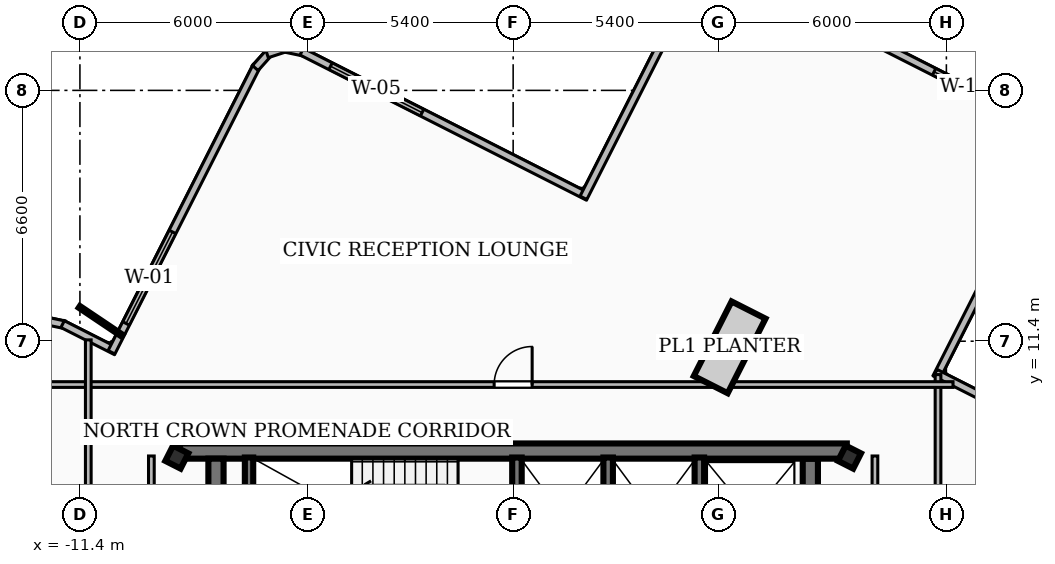
"""IFC4 building model, lengths in metres.
Left out: names, types, materials, properties, quantities, classifications, styles, units other than length and angle.
Written with IfcOpenShell. Run it as: python <this file> out.ifc"""

import sys

from ifc_helpers import new_model, si_unit, direction, frame, frame_2d, origin, origin_2d, place, context, subcontext, project, spatial, rectangle, hollow_rectangle, extrude, element, fill, save


model = new_model("IFC4")
c1 = context("Model", 3, precision=1e-05, world=origin(), true_north=direction((0.0, 1.0)))
c2 = subcontext(c1, "Body", "Model", "MODEL_VIEW")
j1 = project(units=[si_unit("LENGTHUNIT", "METRE"), si_unit("PLANEANGLEUNIT", "RADIAN")], contexts=[c1])
p1 = place(None, origin())
s1 = spatial("IfcSite", under=j1, at=p1, CompositionType="ELEMENT")
p2 = place(p1, origin())
s2 = spatial("IfcBuilding", under=s1, at=p2, CompositionType="ELEMENT")
p3 = place(p2, frame((0.0, 0.0, 289.26)))
s3 = spatial("IfcBuildingStorey", under=s2, at=p3, CompositionType="ELEMENT", Elevation=289.26)
p4 = place(p3, frame((-8.78, 8.51, 0.0), z_axis=(0.0, 0.0, 1.0), x_axis=(1.0, 0.0, 0.0)))
e1 = element("IfcWall", 1, at=p4, inside=s3, PredefinedType="SHEAR", context=c2, shape_type="SweptSolid", body=[
    extrude(rectangle(XDim=17.56, YDim=0.4, at=frame_2d((8.78, 0.0))), origin(), (0.0, 0.0, 1.0), 3.84),
])
for number, where, z_axis, x_axis in (
    (2, (-7.82, 1.95, 0.0), (0.0, 0.0, 1.0), (0.0, 1.0, 0.0)),
    (3, (7.82, 8.31, 0.0), (0.0, 0.0, 1.0), (0.0, -1.0, 0.0)),
):
    element("IfcWall", number, at=place(p3, frame(where, z_axis=z_axis, x_axis=x_axis)), inside=s3, PredefinedType="SHEAR", context=c2, shape_type="SweptSolid", body=[
        extrude(rectangle(XDim=6.36, YDim=0.4, at=frame_2d((3.18, 0.0))), origin(), (0.0, 0.0, 1.0), 3.84),
    ])
p5 = place(p3, frame((-6.95, 5.28, 0.0), z_axis=(0.0, 0.0, 1.0), x_axis=(0.0, 1.0, 0.0)))
e4 = element("IfcWall", 4, at=p5, inside=s3, PredefinedType="SOLIDWALL", context=c2, shape_type="SweptSolid", body=[
    extrude(rectangle(XDim=3.06, YDim=0.22, at=frame_2d((1.53, 0.0))), origin(), (0.0, 0.0, 1.0), 3.84),
])
for number, where, z_axis, x_axis in (
    (5, (0.1, 5.3, 0.0), (0.0, 0.0, 1.0), (0.0, 1.0, 0.0)),
    (6, (2.5, 5.3, 0.0), (0.0, 0.0, 1.0), (0.0, 1.0, 0.0)),
    (7, (4.9, 5.3, 0.0), (0.0, 0.0, 1.0), (0.0, 1.0, 0.0)),
):
    element("IfcWall", number, at=place(p3, frame(where, z_axis=z_axis, x_axis=x_axis)), inside=s3, PredefinedType="SOLIDWALL", context=c2, shape_type="SweptSolid", body=[
        extrude(rectangle(XDim=3.04, YDim=0.25, at=frame_2d((1.52, 0.0))), origin(), (0.0, 0.0, 1.0), 3.84),
    ])
for number, where, z_axis, x_axis in (
    (8, (-8.85, 8.35, 0.0), (0.0, 0.0, 1.0), (0.452, 0.892, 0.0)),
    (9, (8.85, 8.35, 0.0), (0.0, 0.0, 1.0), (0.452, 0.892, 0.0)),
):
    element("IfcColumn", number, at=place(p3, frame(where, z_axis=z_axis, x_axis=x_axis)), inside=s3, PredefinedType="COLUMN", context=c2, shape_type="SweptSolid", body=[
        extrude(hollow_rectangle(XDim=0.45, YDim=0.45, WallThickness=0.022, at=origin_2d()), origin(), (0.0, 0.0, 1.0), 4.14),
    ])
p6 = place(p3, frame((-12.324, 11.942, 0.0), z_axis=(0.0, 0.0, 1.0), x_axis=(0.978736488985, -0.20512163496, 0.0)))
e10 = element("IfcWall", 10, at=p6, inside=s3, PredefinedType="SOLIDWALL", context=c2, shape_type="SweptSolid", body=[
    extrude(rectangle(XDim=0.526, YDim=0.2, at=frame_2d((0.263, 0.0))), origin(), (0.0, 0.0, 1.0), 3.84),
])
p7 = place(p3, frame((-11.855, 11.85, 0.0), z_axis=(0.0, 0.0, 1.0), x_axis=(0.891975264725, -0.452084203572, 0.0)))
e11 = element("IfcWall", 11, at=p7, inside=s3, PredefinedType="SOLIDWALL", context=c2, shape_type="SweptSolid", body=[
    extrude(rectangle(XDim=1.562, YDim=0.2, at=frame_2d((0.781, 0.0))), origin(), (0.0, 0.0, 1.0), 3.84),
])
p8 = place(p3, frame((-10.569, 11.109, 0.0), z_axis=(0.0, 0.0, 1.0), x_axis=(0.452141134176, 0.891946408024, 0.0)))
e12 = element("IfcWall", 12, at=p8, inside=s3, PredefinedType="SOLIDWALL", context=c2, shape_type="SweptSolid", body=[
    extrude(rectangle(XDim=8.431, YDim=0.2, at=frame_2d((4.215, 0.0))), origin(), (0.0, 0.0, 1.0), 3.84),
])
p9 = place(p8, frame((0.85, 0.0, 0.85)))
e13 = element("IfcOpeningElement", 13, at=p9, cuts=e12, PredefinedType="OPENING", context=c2, shape_type="SweptSolid", body=[
    extrude(rectangle(XDim=2.7, YDim=2.1, at=frame_2d((1.35, 1.05))), frame((0.0, 0.11, 0.0), z_axis=(0.0, -1.0, 0.0), x_axis=(1.0, 0.0, 0.0)), (0.0, 0.0, 1.0), 0.22),
])
p10 = place(p3, frame((-6.785, 18.588, 0.0), z_axis=(0.0, 0.0, 1.0), x_axis=(0.665997400104, 0.745954062295, 0.0)))
e14 = element("IfcWall", 14, at=p10, inside=s3, PredefinedType="SOLIDWALL", context=c2, shape_type="SweptSolid", body=[
    extrude(rectangle(XDim=0.528, YDim=0.2, at=frame_2d((0.264, 0.0))), origin(), (0.0, 0.0, 1.0), 3.84),
])
p11 = place(p3, frame((-6.474, 18.955, 0.0), z_axis=(0.0, 0.0, 1.0), x_axis=(0.950471064968, 0.310813054196, 0.0)))
e15 = element("IfcWall", 15, at=p11, inside=s3, PredefinedType="SOLIDWALL", context=c2, shape_type="SweptSolid", body=[
    extrude(rectangle(XDim=0.514, YDim=0.2, at=frame_2d((0.257, 0.0))), origin(), (0.0, 0.0, 1.0), 3.84),
])
p12 = place(p3, frame((-6.033, 19.112, 0.0), z_axis=(0.0, 0.0, 1.0), x_axis=(0.978721450967, -0.205193375664, 0.0)))
e16 = element("IfcWall", 16, at=p12, inside=s3, PredefinedType="SOLIDWALL", context=c2, shape_type="SweptSolid", body=[
    extrude(rectangle(XDim=0.527, YDim=0.2, at=frame_2d((0.264, 0.0))), origin(), (0.0, 0.0, 1.0), 3.84),
])
p13 = place(p3, frame((-5.563, 19.02, 0.0), z_axis=(0.0, 0.0, 1.0), x_axis=(0.891946408024, -0.452141134176, 0.0)))
e17 = element("IfcWall", 17, at=p13, inside=s3, PredefinedType="SOLIDWALL", context=c2, shape_type="SweptSolid", body=[
    extrude(rectangle(XDim=8.431, YDim=0.2, at=frame_2d((4.215, 0.0))), origin(), (0.0, 0.0, 1.0), 3.84),
])
p14 = place(p13, frame((0.85, 0.0, 0.85)))
e18 = element("IfcOpeningElement", 18, at=p14, cuts=e17, PredefinedType="OPENING", context=c2, shape_type="SweptSolid", body=[
    extrude(rectangle(XDim=2.7, YDim=1.85, at=frame_2d((1.35, 0.925))), frame((0.0, 0.11, 0.0), z_axis=(0.0, -1.0, 0.0), x_axis=(1.0, 0.0, 0.0)), (0.0, 0.0, 1.0), 0.22),
])
p15 = place(p3, frame((1.85, 15.173, 0.0), z_axis=(0.0, 0.0, 1.0), x_axis=(0.452151126281, 0.891941342804, 0.0)))
e19 = element("IfcWall", 19, at=p15, inside=s3, PredefinedType="SOLIDWALL", context=c2, shape_type="SweptSolid", body=[
    extrude(rectangle(XDim=6.241, YDim=0.2, at=frame_2d((3.121, 0.0))), origin(), (0.0, 0.0, 1.0), 3.84),
])
p16 = place(p3, frame((5.866, 21.131, 0.0), z_axis=(0.0, 0.0, 1.0), x_axis=(0.89192763746, -0.452178161276, 0.0)))
e20 = element("IfcWall", 20, at=p16, inside=s3, PredefinedType="SOLIDWALL", context=c2, shape_type="SweptSolid", body=[
    extrude(rectangle(XDim=8.643, YDim=0.2, at=frame_2d((4.322, 0.0))), origin(), (0.0, 0.0, 1.0), 3.84),
])
p17 = place(p16, frame((5.842, 0.0, 0.85)))
e21 = element("IfcOpeningElement", 21, at=p17, cuts=e20, PredefinedType="OPENING", context=c2, shape_type="SweptSolid", body=[
    extrude(rectangle(XDim=1.8, YDim=1.6, at=frame_2d((0.9, 0.8))), frame((0.0, 0.11, 0.0), z_axis=(0.0, -1.0, 0.0), x_axis=(1.0, 0.0, 0.0)), (0.0, 0.0, 1.0), 0.22),
])
p18 = place(p3, frame((13.966, 16.029, 0.0), z_axis=(0.0, 0.0, 1.0), x_axis=(-0.452135351256, -0.891949339449, 0.0)))
e22 = element("IfcWall", 22, at=p18, inside=s3, PredefinedType="SOLIDWALL", context=c2, shape_type="SweptSolid", body=[
    extrude(rectangle(XDim=6.241, YDim=0.2, at=frame_2d((3.121, 0.0))), origin(), (0.0, 0.0, 1.0), 3.84),
])
p19 = place(p3, frame((11.109, 10.569, 0.0), z_axis=(0.0, 0.0, 1.0), x_axis=(0.891946408024, -0.452141134176, 0.0)))
e23 = element("IfcWall", 23, at=p19, inside=s3, PredefinedType="SOLIDWALL", context=c2, shape_type="SweptSolid", body=[
    extrude(rectangle(XDim=8.431, YDim=0.2, at=frame_2d((4.215, 0.0))), origin(), (0.0, 0.0, 1.0), 3.84),
])
p20 = place(p19, frame((1.35, 0.0, 0.85)))
e24 = element("IfcOpeningElement", 24, at=p20, cuts=e23, PredefinedType="OPENING", context=c2, shape_type="SweptSolid", body=[
    extrude(rectangle(XDim=2.7, YDim=1.85, at=frame_2d((1.35, 0.925))), frame((0.0, 0.11, 0.0), z_axis=(0.0, -1.0, 0.0), x_axis=(1.0, 0.0, 0.0)), (0.0, 0.0, 1.0), 0.22),
])
p21 = place(p3, frame((-9.52, 1.75, 0.0), z_axis=(0.0, 0.0, 1.0), x_axis=(0.0, 1.0, 0.0)))
e25 = element("IfcWall", 25, at=p21, inside=s3, PredefinedType="PARTITIONING", context=c2, shape_type="SweptSolid", body=[
    extrude(rectangle(XDim=6.63, YDim=0.15, at=frame_2d((3.315, 0.0))), origin(), (0.0, 0.0, 1.0), 3.21),
])
p22 = place(p3, frame((9.52, 1.75, 0.0), z_axis=(0.0, 0.0, 1.0), x_axis=(0.0, 1.0, 0.0)))
e26 = element("IfcWall", 26, at=p22, inside=s3, PredefinedType="PARTITIONING", context=c2, shape_type="SweptSolid", body=[
    extrude(rectangle(XDim=6.63, YDim=0.15, at=frame_2d((3.315, 0.0))), origin(), (0.0, 0.0, 1.0), 3.84),
])
p23 = place(p3, frame((11.18, 10.522, 0.0), z_axis=(0.0, 0.0, 1.0), x_axis=(0.0, -1.0, 0.0)))
e27 = element("IfcWall", 27, at=p23, inside=s3, PredefinedType="PARTITIONING", context=c2, shape_type="SweptSolid", body=[
    extrude(rectangle(XDim=21.957, YDim=0.15, at=frame_2d((10.979, 0.0))), origin(), (0.0, 0.0, 1.0), 3.84),
])
p24 = place(p23, frame((10.022, 0.0, 0.0)))
e28 = element("IfcOpeningElement", 28, at=p24, cuts=e27, PredefinedType="OPENING", context=c2, shape_type="SweptSolid", body=[
    extrude(rectangle(XDim=1.0, YDim=2.1, at=frame_2d((0.5, 1.05))), frame((0.0, 0.085, 0.0), z_axis=(0.0, -1.0, 0.0), x_axis=(1.0, 0.0, 0.0)), (0.0, 0.0, 1.0), 0.17),
])
p25 = place(p3, frame((-13.584, 10.26, 0.0), z_axis=(0.0, 0.0, 1.0), x_axis=(1.0, 0.0, 0.0)))
e29 = element("IfcWall", 29, at=p25, inside=s3, PredefinedType="PARTITIONING", context=c2, shape_type="SweptSolid", body=[
    extrude(rectangle(XDim=25.159, YDim=0.15, at=frame_2d((12.58, 0.0))), origin(), (0.0, 0.0, 1.0), 3.21),
])
p26 = place(p25, frame((13.084, 0.0, 0.0)))
e30 = element("IfcOpeningElement", 30, at=p26, cuts=e29, PredefinedType="OPENING", context=c2, shape_type="SweptSolid", body=[
    extrude(rectangle(XDim=1.0, YDim=2.1, at=frame_2d((0.5, 1.05))), frame((0.0, 0.085, 0.0), z_axis=(0.0, -1.0, 0.0), x_axis=(1.0, 0.0, 0.0)), (0.0, 0.0, 1.0), 0.17),
])
p27 = place(p3, frame((-11.18, -10.568, 0.0), z_axis=(0.0, 0.0, 1.0), x_axis=(0.0, 1.0, 0.0)))
e31 = element("IfcWall", 31, at=p27, inside=s3, PredefinedType="PARTITIONING", context=c2, shape_type="SweptSolid", body=[
    extrude(rectangle(XDim=22.003, YDim=0.15, at=frame_2d((11.001, 0.0))), origin(), (0.0, 0.0, 1.0), 3.84),
])
p28 = place(p27, frame((8.468, 0.0, 0.0)))
e32 = element("IfcOpeningElement", 32, at=p28, cuts=e31, PredefinedType="OPENING", context=c2, shape_type="SweptSolid", body=[
    extrude(rectangle(XDim=1.0, YDim=2.1, at=frame_2d((0.5, 1.05))), frame((0.0, 0.085, 0.0), z_axis=(0.0, -1.0, 0.0), x_axis=(1.0, 0.0, 0.0)), (0.0, 0.0, 1.0), 0.17),
])
p29 = place(p9, origin())
e33 = element("IfcWindow", 33, at=p29, inside=s3, PartitioningType="SINGLE_PANEL", PredefinedType="WINDOW", context=c2, shape_type="SweptSolid", body=[
    extrude(rectangle(XDim=2.7, YDim=2.1, at=frame_2d((1.35, 1.05))), frame((0.0, 0.03, 0.0), z_axis=(0.0, -1.0, 0.0), x_axis=(1.0, 0.0, 0.0)), (0.0, 0.0, 1.0), 0.06),
])
fill(e13, e33)
p30 = place(p14, origin())
e34 = element("IfcWindow", 34, at=p30, inside=s3, PartitioningType="SINGLE_PANEL", PredefinedType="WINDOW", context=c2, shape_type="SweptSolid", body=[
    extrude(rectangle(XDim=2.7, YDim=1.85, at=frame_2d((1.35, 0.925))), frame((0.0, 0.03, 0.0), z_axis=(0.0, -1.0, 0.0), x_axis=(1.0, 0.0, 0.0)), (0.0, 0.0, 1.0), 0.06),
])
fill(e18, e34)
p31 = place(p17, origin())
e35 = element("IfcWindow", 35, at=p31, inside=s3, PartitioningType="SINGLE_PANEL", PredefinedType="WINDOW", context=c2, shape_type="SweptSolid", body=[
    extrude(rectangle(XDim=1.8, YDim=1.6, at=frame_2d((0.9, 0.8))), frame((0.0, 0.03, 0.0), z_axis=(0.0, -1.0, 0.0), x_axis=(1.0, 0.0, 0.0)), (0.0, 0.0, 1.0), 0.06),
])
fill(e21, e35)
p32 = place(p26, origin())
e36 = element("IfcDoor", 36, at=p32, inside=s3, OperationType="SINGLE_SWING_RIGHT", PredefinedType="DOOR", context=c2, shape_type="SweptSolid", body=[
    extrude(rectangle(XDim=1.0, YDim=2.1, at=frame_2d((0.5, 1.05))), frame((0.0, 0.025, 0.0), z_axis=(0.0, -1.0, 0.0), x_axis=(1.0, 0.0, 0.0)), (0.0, 0.0, 1.0), 0.05),
])
fill(e30, e36)
save(model, sys.argv[1])
